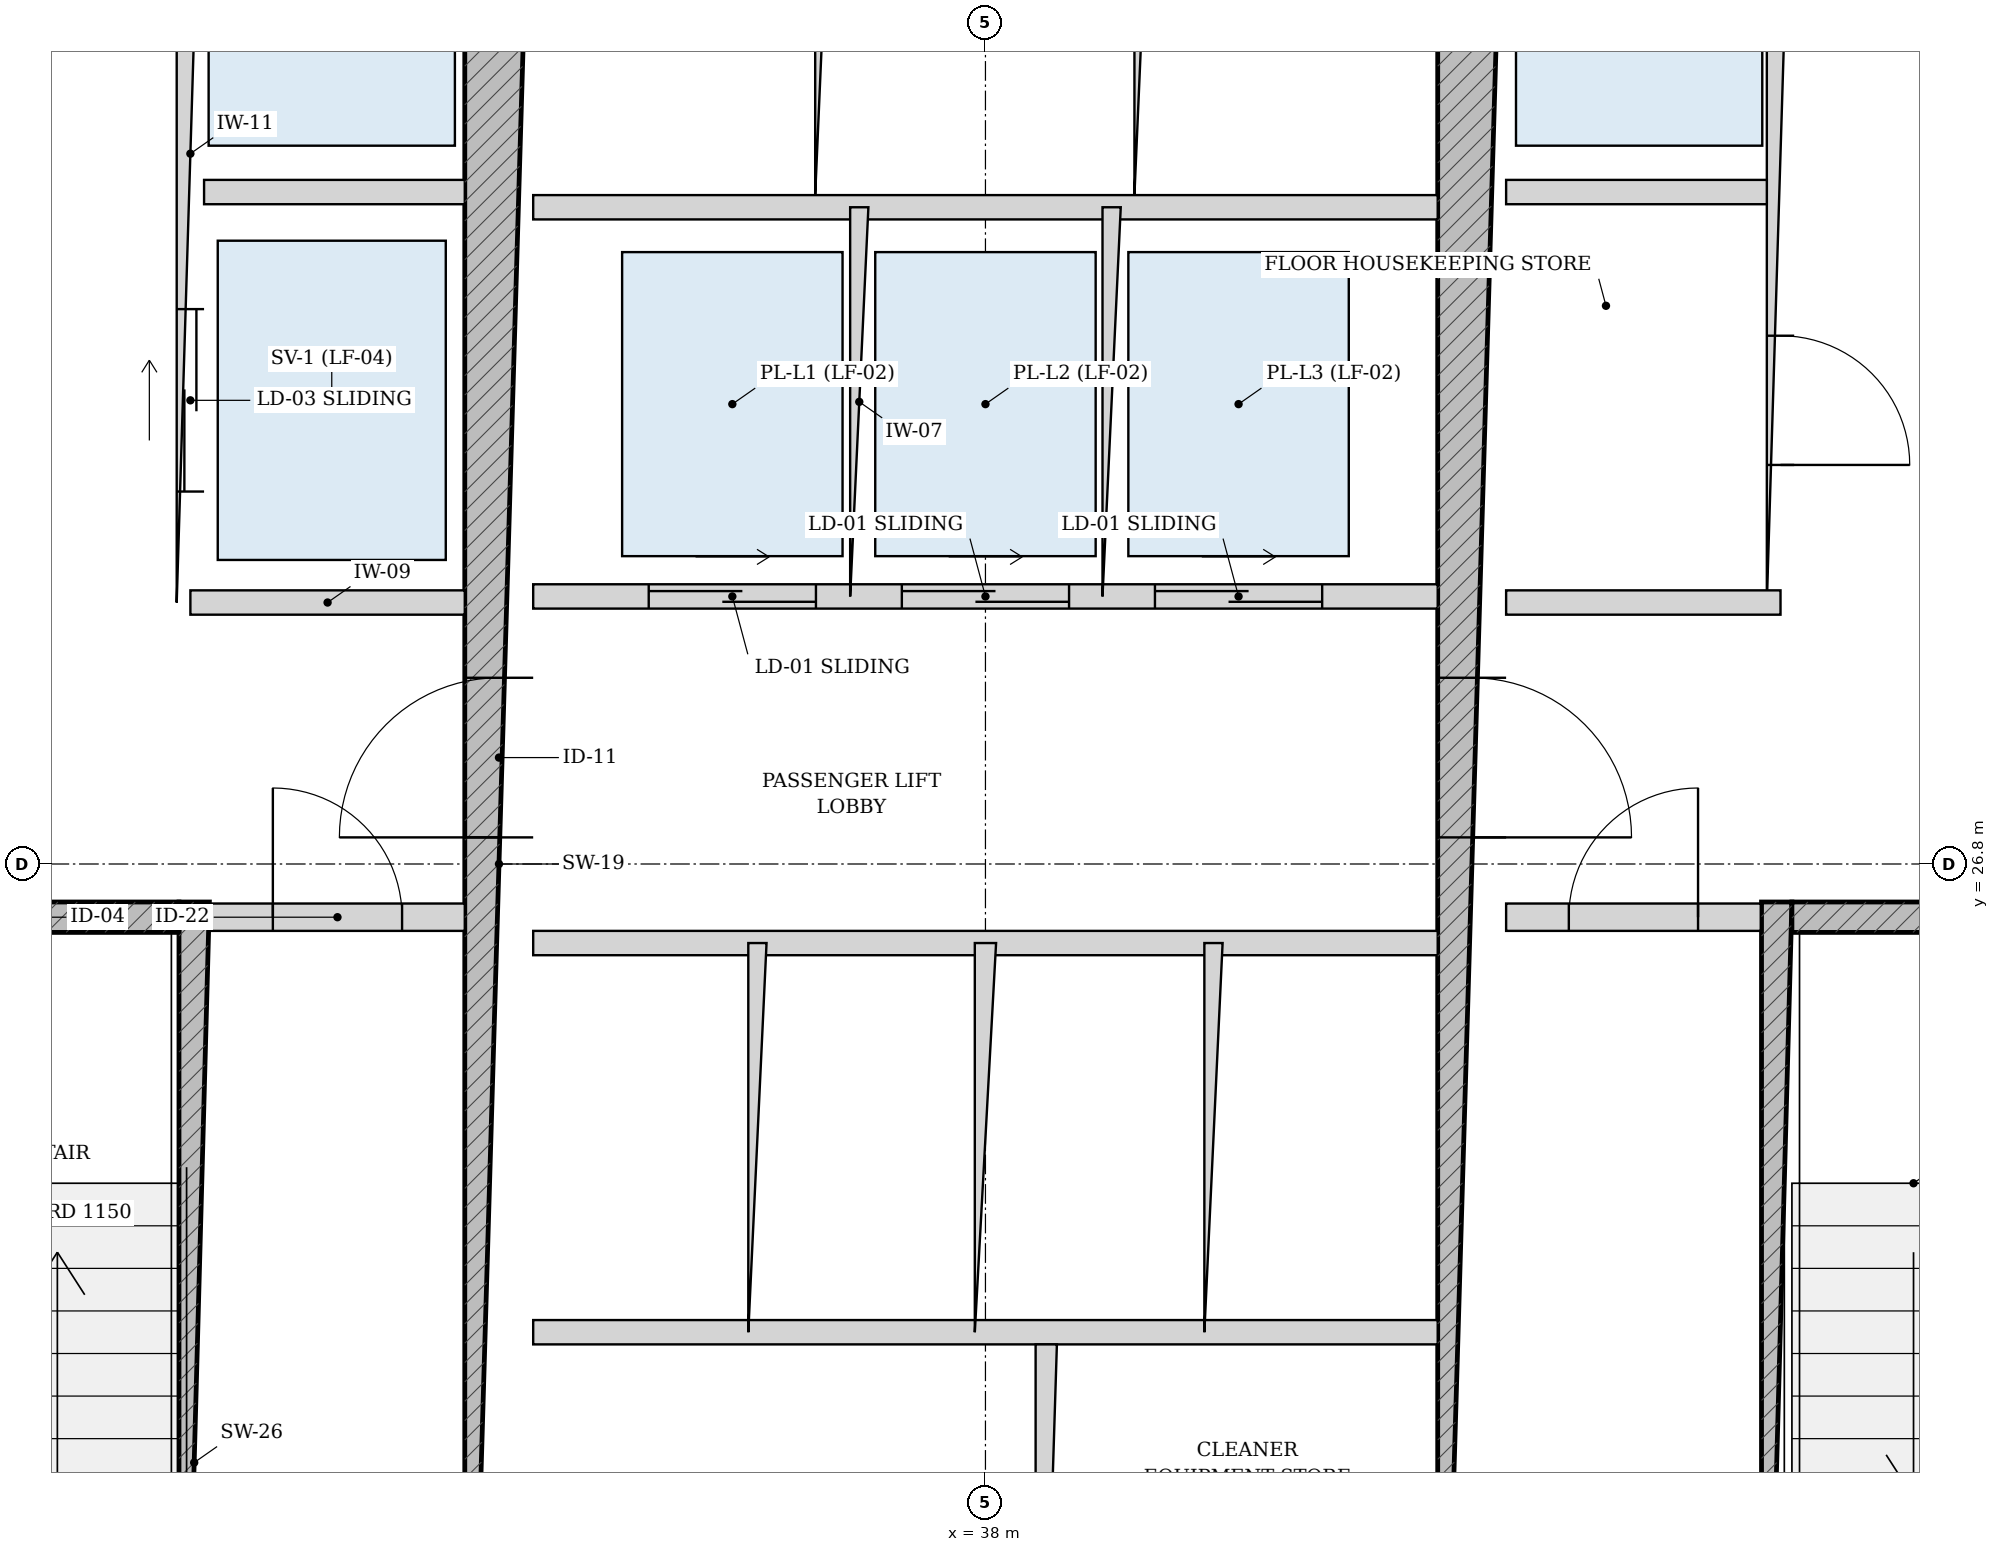
"""IFC4 building model, lengths in metres.
Left out: names, types, materials, properties, quantities, classifications, styles, units other than length and angle.
Written with IfcOpenShell. Run it as: python <this file> out.ifc"""

import sys

from ifc_helpers import new_model, si_unit, direction, frame, frame_2d, origin, place, context, subcontext, project, spatial, rectangle, extrude, source, transform, mapped, element, fill, save


model = new_model("IFC4")
c1 = context("Model", 3, precision=1e-05, world=origin(), true_north=direction((-0.2419218956, 0.970295726276)))
c2 = subcontext(c1, "Body", "Model", "MODEL_VIEW")
j1 = project(units=[si_unit("LENGTHUNIT", "METRE"), si_unit("PLANEANGLEUNIT", "RADIAN")], contexts=[c1])
p1 = place(None, origin())
s1 = spatial("IfcSite", under=j1, at=p1, CompositionType="ELEMENT")
p2 = place(p1, origin())
s2 = spatial("IfcBuilding", under=s1, at=p2, CompositionType="ELEMENT")
p3 = place(p2, frame((0.0, 0.0, 45.6)))
s3 = spatial("IfcBuildingStorey", under=s2, at=p3, CompositionType="ELEMENT", Elevation=45.6)
p4 = place(p3, frame((32.795, 19.175, 0.0), z_axis=(0.0, 0.0, 1.0), x_axis=(0.0, 1.0, 0.0)))
e1 = element("IfcWall", 1, at=p4, inside=s3, PredefinedType="SOLIDWALL", context=c2, shape_type="SweptSolid", body=[
    extrude(rectangle(XDim=7.375, YDim=0.2, at=frame_2d((3.688, 0.0))), origin(), (0.0, 0.0, 1.0), 3.32),
])
p5 = place(p3, frame((29.375, 26.45, 0.0), z_axis=(0.0, 0.0, 1.0), x_axis=(1.0, 0.0, 0.0)))
e2 = element("IfcWall", 2, at=p5, inside=s3, PredefinedType="SOLIDWALL", context=c2, shape_type="SweptSolid", body=[
    extrude(rectangle(XDim=3.32, YDim=0.2, at=frame_2d((1.66, 0.0))), origin(), (0.0, 0.0, 1.0), 3.32),
])
p6 = place(p5, frame((1.185, 0.0, 0.0)))
e3 = element("IfcOpeningElement", 3, at=p6, cuts=e2, PredefinedType="OPENING", context=c2, shape_type="SweptSolid", body=[
    extrude(rectangle(XDim=0.95, YDim=2.15, at=frame_2d((0.475, 1.075))), frame((0.0, 0.11, 0.0), z_axis=(0.0, -1.0, 0.0), x_axis=(1.0, 0.0, 0.0)), (0.0, 0.0, 1.0), 0.22),
])
p7 = place(p3, frame((43.205, 19.175, 0.0), z_axis=(0.0, 0.0, 1.0), x_axis=(0.0, 1.0, 0.0)))
e4 = element("IfcWall", 4, at=p7, inside=s3, PredefinedType="SOLIDWALL", context=c2, shape_type="SweptSolid", body=[
    extrude(rectangle(XDim=7.375, YDim=0.2, at=frame_2d((3.688, 0.0))), origin(), (0.0, 0.0, 1.0), 3.32),
])
p8 = place(p3, frame((43.305, 26.45, 0.0), z_axis=(0.0, 0.0, 1.0), x_axis=(1.0, 0.0, 0.0)))
e5 = element("IfcWall", 5, at=p8, inside=s3, PredefinedType="SOLIDWALL", context=c2, shape_type="SweptSolid", body=[
    extrude(rectangle(XDim=3.32, YDim=0.2, at=frame_2d((1.66, 0.0))), origin(), (0.0, 0.0, 1.0), 3.32),
])
p9 = place(p8, frame((1.185, 0.0, 0.0)))
e6 = element("IfcOpeningElement", 6, at=p9, cuts=e5, PredefinedType="OPENING", context=c2, shape_type="SweptSolid", body=[
    extrude(rectangle(XDim=0.95, YDim=2.15, at=frame_2d((0.475, 1.075))), frame((0.0, 0.11, 0.0), z_axis=(0.0, -1.0, 0.0), x_axis=(1.0, 0.0, 0.0)), (0.0, 0.0, 1.0), 0.22),
])
p10 = place(p3, frame((34.8, 19.175, 0.0), z_axis=(0.0, 0.0, 1.0), x_axis=(0.0, 1.0, 0.0)))
e7 = element("IfcWall", 7, at=p10, inside=s3, PredefinedType="SHEAR", context=c2, shape_type="SweptSolid", body=[
    extrude(rectangle(XDim=15.25, YDim=0.45, at=frame_2d((7.625, 0.0))), origin(), (0.0, 0.0, 1.0), 3.32),
])
p11 = place(p10, frame((7.8, 0.0, 0.0)))
e8 = element("IfcOpeningElement", 8, at=p11, cuts=e7, PredefinedType="OPENING", context=c2, shape_type="SweptSolid", body=[
    extrude(rectangle(XDim=1.05, YDim=2.15, at=frame_2d((0.525, 1.075))), frame((0.0, 0.235, 0.0), z_axis=(0.0, -1.0, 0.0), x_axis=(1.0, 0.0, 0.0)), (0.0, 0.0, 1.0), 0.47),
])
p12 = place(p3, frame((41.2, 19.175, 0.0), z_axis=(0.0, 0.0, 1.0), x_axis=(0.0, 1.0, 0.0)))
e9 = element("IfcWall", 9, at=p12, inside=s3, PredefinedType="SHEAR", context=c2, shape_type="SweptSolid", body=[
    extrude(rectangle(XDim=15.25, YDim=0.45, at=frame_2d((7.625, 0.0))), origin(), (0.0, 0.0, 1.0), 3.32),
])
p13 = place(p12, frame((7.8, 0.0, 0.0)))
e10 = element("IfcOpeningElement", 10, at=p13, cuts=e9, PredefinedType="OPENING", context=c2, shape_type="SweptSolid", body=[
    extrude(rectangle(XDim=1.05, YDim=2.15, at=frame_2d((0.525, 1.075))), frame((0.0, 0.235, 0.0), z_axis=(0.0, -1.0, 0.0), x_axis=(1.0, 0.0, 0.0)), (0.0, 0.0, 1.0), 0.47),
])
p14 = place(p3, frame((32.9, 26.45, 0.0), z_axis=(0.0, 0.0, 1.0), x_axis=(1.0, 0.0, 0.0)))
e11 = element("IfcWall", 11, at=p14, inside=s3, PredefinedType="PARTITIONING", context=c2, shape_type="SweptSolid", body=[
    extrude(rectangle(XDim=1.675, YDim=0.18, at=frame_2d((0.837, 0.0))), origin(), (0.0, 0.0, 1.0), 3.32),
])
p15 = place(p14, frame((0.413, 0.0, 0.0)))
e12 = element("IfcOpeningElement", 12, at=p15, cuts=e11, PredefinedType="OPENING", context=c2, shape_type="SweptSolid", body=[
    extrude(rectangle(XDim=0.85, YDim=2.1, at=frame_2d((0.425, 1.05))), frame((0.0, 0.1, 0.0), z_axis=(0.0, -1.0, 0.0), x_axis=(1.0, 0.0, 0.0)), (0.0, 0.0, 1.0), 0.2),
])
p16 = place(p3, frame((41.425, 26.45, 0.0), z_axis=(0.0, 0.0, 1.0), x_axis=(1.0, 0.0, 0.0)))
e13 = element("IfcWall", 13, at=p16, inside=s3, PredefinedType="PARTITIONING", context=c2, shape_type="SweptSolid", body=[
    extrude(rectangle(XDim=1.675, YDim=0.18, at=frame_2d((0.837, 0.0))), origin(), (0.0, 0.0, 1.0), 3.32),
])
p17 = place(p16, frame((0.413, 0.0, 0.0)))
e14 = element("IfcOpeningElement", 14, at=p17, cuts=e13, PredefinedType="OPENING", context=c2, shape_type="SweptSolid", body=[
    extrude(rectangle(XDim=0.85, YDim=2.1, at=frame_2d((0.425, 1.05))), frame((0.0, 0.1, 0.0), z_axis=(0.0, -1.0, 0.0), x_axis=(1.0, 0.0, 0.0)), (0.0, 0.0, 1.0), 0.2),
])
p18 = place(p3, frame((32.77, 28.52, 0.0), z_axis=(0.0, 0.0, 1.0), x_axis=(0.0, 1.0, 0.0)))
e15 = element("IfcWall", 15, at=p18, inside=s3, PredefinedType="PARTITIONING", context=c2, shape_type="SweptSolid", body=[
    extrude(rectangle(XDim=5.905, YDim=0.18, at=frame_2d((2.953, 0.0))), origin(), (0.0, 0.0, 1.0), 3.32),
])
p19 = place(p18, frame((3.655, 0.0, 0.0)))
e16 = element("IfcOpeningElement", 16, at=p19, cuts=e15, PredefinedType="OPENING", context=c2, shape_type="SweptSolid", body=[
    extrude(rectangle(XDim=1.15, YDim=2.2, at=frame_2d((0.575, 1.1))), frame((0.0, 0.1, 0.0), z_axis=(0.0, -1.0, 0.0), x_axis=(1.0, 0.0, 0.0)), (0.0, 0.0, 1.0), 0.2),
])
p20 = place(p18, frame((0.73, 0.0, 0.0)))
e17 = element("IfcOpeningElement", 17, at=p20, cuts=e15, PredefinedType="OPENING", context=c2, shape_type="SweptSolid", body=[
    extrude(rectangle(XDim=1.2, YDim=2.25, at=frame_2d((0.6, 1.125))), frame((0.0, 0.1, 0.0), z_axis=(0.0, -1.0, 0.0), x_axis=(1.0, 0.0, 0.0)), (0.0, 0.0, 1.0), 0.2),
])
p21 = place(p3, frame((32.86, 31.22, 0.0), z_axis=(0.0, 0.0, 1.0), x_axis=(1.0, 0.0, 0.0)))
e18 = element("IfcWall", 18, at=p21, inside=s3, PredefinedType="PARTITIONING", context=c2, shape_type="SweptSolid", body=[
    extrude(rectangle(XDim=1.715, YDim=0.16, at=frame_2d((0.857, 0.0))), origin(), (0.0, 0.0, 1.0), 3.32),
])
p22 = place(p3, frame((32.77, 28.52, 0.0), z_axis=(0.0, 0.0, 1.0), x_axis=(1.0, 0.0, 0.0)))
e19 = element("IfcWall", 19, at=p22, inside=s3, PredefinedType="PARTITIONING", context=c2, shape_type="SweptSolid", body=[
    extrude(rectangle(XDim=1.805, YDim=0.16, at=frame_2d((0.902, 0.0))), origin(), (0.0, 0.0, 1.0), 3.32),
])
p23 = place(p3, frame((43.23, 28.52, 0.0), z_axis=(0.0, 0.0, 1.0), x_axis=(0.0, 1.0, 0.0)))
e20 = element("IfcWall", 20, at=p23, inside=s3, PredefinedType="PARTITIONING", context=c2, shape_type="SweptSolid", body=[
    extrude(rectangle(XDim=5.905, YDim=0.18, at=frame_2d((2.953, 0.0))), origin(), (0.0, 0.0, 1.0), 3.32),
])
p24 = place(p23, frame((0.905, 0.0, 0.0)))
e21 = element("IfcOpeningElement", 21, at=p24, cuts=e20, PredefinedType="OPENING", context=c2, shape_type="SweptSolid", body=[
    extrude(rectangle(XDim=0.85, YDim=2.1, at=frame_2d((0.425, 1.05))), frame((0.0, 0.1, 0.0), z_axis=(0.0, -1.0, 0.0), x_axis=(1.0, 0.0, 0.0)), (0.0, 0.0, 1.0), 0.2),
])
p25 = place(p23, frame((3.655, 0.0, 0.0)))
e22 = element("IfcOpeningElement", 22, at=p25, cuts=e20, PredefinedType="OPENING", context=c2, shape_type="SweptSolid", body=[
    extrude(rectangle(XDim=1.15, YDim=2.2, at=frame_2d((0.575, 1.1))), frame((0.0, 0.1, 0.0), z_axis=(0.0, -1.0, 0.0), x_axis=(1.0, 0.0, 0.0)), (0.0, 0.0, 1.0), 0.2),
])
p26 = place(p3, frame((41.425, 31.22, 0.0), z_axis=(0.0, 0.0, 1.0), x_axis=(1.0, 0.0, 0.0)))
e23 = element("IfcWall", 23, at=p26, inside=s3, PredefinedType="PARTITIONING", context=c2, shape_type="SweptSolid", body=[
    extrude(rectangle(XDim=1.715, YDim=0.16, at=frame_2d((0.857, 0.0))), origin(), (0.0, 0.0, 1.0), 3.32),
])
p27 = place(p3, frame((41.425, 28.52, 0.0), z_axis=(0.0, 0.0, 1.0), x_axis=(1.0, 0.0, 0.0)))
e24 = element("IfcWall", 24, at=p27, inside=s3, PredefinedType="PARTITIONING", context=c2, shape_type="SweptSolid", body=[
    extrude(rectangle(XDim=1.805, YDim=0.16, at=frame_2d((0.902, 0.0))), origin(), (0.0, 0.0, 1.0), 3.32),
])
p28 = place(p3, frame((35.025, 28.56, 0.0), z_axis=(0.0, 0.0, 1.0), x_axis=(1.0, 0.0, 0.0)))
e25 = element("IfcWall", 25, at=p28, inside=s3, PredefinedType="PARTITIONING", context=c2, shape_type="SweptSolid", body=[
    extrude(rectangle(XDim=5.95, YDim=0.16, at=frame_2d((2.975, 0.0))), origin(), (0.0, 0.0, 1.0), 3.32),
])
p29 = place(p28, frame((0.76, 0.0, 0.0)))
e26 = element("IfcOpeningElement", 26, at=p29, cuts=e25, PredefinedType="OPENING", context=c2, shape_type="SweptSolid", body=[
    extrude(rectangle(XDim=1.1, YDim=2.2, at=frame_2d((0.55, 1.1))), frame((0.0, 0.09, 0.0), z_axis=(0.0, -1.0, 0.0), x_axis=(1.0, 0.0, 0.0)), (0.0, 0.0, 1.0), 0.18),
])
p30 = place(p28, frame((2.425, 0.0, 0.0)))
e27 = element("IfcOpeningElement", 27, at=p30, cuts=e25, PredefinedType="OPENING", context=c2, shape_type="SweptSolid", body=[
    extrude(rectangle(XDim=1.1, YDim=2.2, at=frame_2d((0.55, 1.1))), frame((0.0, 0.09, 0.0), z_axis=(0.0, -1.0, 0.0), x_axis=(1.0, 0.0, 0.0)), (0.0, 0.0, 1.0), 0.18),
])
p31 = place(p28, frame((4.09, 0.0, 0.0)))
e28 = element("IfcOpeningElement", 28, at=p31, cuts=e25, PredefinedType="OPENING", context=c2, shape_type="SweptSolid", body=[
    extrude(rectangle(XDim=1.1, YDim=2.2, at=frame_2d((0.55, 1.1))), frame((0.0, 0.09, 0.0), z_axis=(0.0, -1.0, 0.0), x_axis=(1.0, 0.0, 0.0)), (0.0, 0.0, 1.0), 0.18),
])
p32 = place(p3, frame((35.025, 31.12, 0.0), z_axis=(0.0, 0.0, 1.0), x_axis=(1.0, 0.0, 0.0)))
e29 = element("IfcWall", 29, at=p32, inside=s3, PredefinedType="PARTITIONING", context=c2, shape_type="SweptSolid", body=[
    extrude(rectangle(XDim=5.95, YDim=0.16, at=frame_2d((2.975, 0.0))), origin(), (0.0, 0.0, 1.0), 3.32),
])
for number, where, z_axis, x_axis in (
    (30, (37.17, 28.56, 0.0), (0.0, 0.0, 1.0), (0.0, 1.0, 0.0)),
    (31, (38.83, 28.56, 0.0), (0.0, 0.0, 1.0), (0.0, 1.0, 0.0)),
):
    element("IfcWall", number, at=place(p3, frame(where, z_axis=z_axis, x_axis=x_axis)), inside=s3, PredefinedType="PARTITIONING", context=c2, shape_type="SweptSolid", body=[
        extrude(rectangle(XDim=2.56, YDim=0.12, at=frame_2d((1.28, 0.0))), origin(), (0.0, 0.0, 1.0), 3.32),
    ])
for number, where, z_axis, x_axis in (
    (32, (36.95, 31.2, 0.0), (0.0, 0.0, 1.0), (0.0, 1.0, 0.0)),
    (33, (39.05, 31.2, 0.0), (0.0, 0.0, 1.0), (0.0, 1.0, 0.0)),
):
    element("IfcWall", number, at=place(p3, frame(where, z_axis=z_axis, x_axis=x_axis)), inside=s3, PredefinedType="PARTITIONING", context=c2, shape_type="SweptSolid", body=[
        extrude(rectangle(XDim=3.225, YDim=0.14, at=frame_2d((1.613, 0.0))), origin(), (0.0, 0.0, 1.0), 3.32),
    ])
for number, where, z_axis, x_axis in (
    (34, (35.025, 26.28, 0.0), (0.0, 0.0, 1.0), (1.0, 0.0, 0.0)),
    (35, (35.025, 23.72, 0.0), (0.0, 0.0, 1.0), (1.0, 0.0, 0.0)),
):
    element("IfcWall", number, at=place(p3, frame(where, z_axis=z_axis, x_axis=x_axis)), inside=s3, PredefinedType="PARTITIONING", context=c2, shape_type="SweptSolid", body=[
        extrude(rectangle(XDim=5.95, YDim=0.16, at=frame_2d((2.975, 0.0))), origin(), (0.0, 0.0, 1.0), 3.32),
    ])
p33 = place(p3, frame((36.5, 23.72, 0.0), z_axis=(0.0, 0.0, 1.0), x_axis=(0.0, 1.0, 0.0)))
e36 = element("IfcWall", 36, at=p33, inside=s3, PredefinedType="PARTITIONING", context=c2, shape_type="SweptSolid", body=[
    extrude(rectangle(XDim=2.56, YDim=0.12, at=frame_2d((1.28, 0.0))), origin(), (0.0, 0.0, 1.0), 3.32),
])
p34 = place(p3, frame((38.0, 23.72, 0.0), z_axis=(0.0, 0.0, 1.0), x_axis=(0.0, 1.0, 0.0)))
e37 = element("IfcWall", 37, at=p34, inside=s3, PredefinedType="PARTITIONING", context=c2, shape_type="SweptSolid", body=[
    extrude(rectangle(XDim=2.56, YDim=0.14, at=frame_2d((1.28, 0.0))), origin(), (0.0, 0.0, 1.0), 3.32),
])
p35 = place(p3, frame((39.5, 23.72, 0.0), z_axis=(0.0, 0.0, 1.0), x_axis=(0.0, 1.0, 0.0)))
e38 = element("IfcWall", 38, at=p35, inside=s3, PredefinedType="PARTITIONING", context=c2, shape_type="SweptSolid", body=[
    extrude(rectangle(XDim=2.56, YDim=0.12, at=frame_2d((1.28, 0.0))), origin(), (0.0, 0.0, 1.0), 3.32),
])
p36 = place(p3, frame((38.4, 19.175, 0.0), z_axis=(0.0, 0.0, 1.0), x_axis=(0.0, 1.0, 0.0)))
e39 = element("IfcWall", 39, at=p36, inside=s3, PredefinedType="PARTITIONING", context=c2, shape_type="SweptSolid", body=[
    extrude(rectangle(XDim=4.465, YDim=0.14, at=frame_2d((2.232, 0.0))), origin(), (0.0, 0.0, 1.0), 3.32),
])
m1 = source(origin(), c2, "Body", "SweptSolid", [
    extrude(rectangle(XDim=1.05, YDim=2.15, at=frame_2d((0.525, 1.075))), frame((0.0, 0.025, 0.0), z_axis=(0.0, -1.0, 0.0), x_axis=(1.0, 0.0, 0.0)), (0.0, 0.0, 1.0), 0.05),
])
p37 = place(p11, origin())
e40 = element("IfcDoor", 40, at=p37, inside=s3, OperationType="SINGLE_SWING_LEFT", PredefinedType="DOOR", context=c2, shape_type="MappedRepresentation", body=[
    mapped(m1, transform((0.0, 0.0, 0.0), scale=1.0)),
])
fill(e8, e40)
p38 = place(p13, frame((1.05, 0.0, 0.0), z_axis=(0.0, 0.0, 1.0), x_axis=(-1.0, 0.0, 0.0)))
e41 = element("IfcDoor", 41, at=p38, inside=s3, OperationType="SINGLE_SWING_RIGHT", PredefinedType="DOOR", context=c2, shape_type="MappedRepresentation", body=[
    mapped(m1, transform((0.0, 0.0, 0.0), scale=1.0)),
])
fill(e10, e41)
m2 = source(origin(), c2, "Body", "SweptSolid", [
    extrude(rectangle(XDim=0.85, YDim=2.1, at=frame_2d((0.425, 1.05))), frame((0.0, 0.025, 0.0), z_axis=(0.0, -1.0, 0.0), x_axis=(1.0, 0.0, 0.0)), (0.0, 0.0, 1.0), 0.05),
])
p39 = place(p15, origin())
e42 = element("IfcDoor", 42, at=p39, inside=s3, OperationType="SINGLE_SWING_LEFT", PredefinedType="DOOR", context=c2, shape_type="MappedRepresentation", body=[
    mapped(m2, transform((0.0, 0.0, 0.0), scale=1.0)),
])
fill(e12, e42)
p40 = place(p17, origin())
e43 = element("IfcDoor", 43, at=p40, inside=s3, OperationType="SINGLE_SWING_RIGHT", PredefinedType="DOOR", context=c2, shape_type="MappedRepresentation", body=[
    mapped(m2, transform((0.0, 0.0, 0.0), scale=1.0)),
])
fill(e14, e43)
p41 = place(p24, frame((0.85, 0.0, 0.0), z_axis=(0.0, 0.0, 1.0), x_axis=(-1.0, 0.0, 0.0)))
e44 = element("IfcDoor", 44, at=p41, inside=s3, OperationType="SINGLE_SWING_RIGHT", PredefinedType="DOOR", context=c2, shape_type="MappedRepresentation", body=[
    mapped(m2, transform((0.0, 0.0, 0.0), scale=1.0)),
])
fill(e21, e44)
m3 = source(origin(), c2, "Body", "SweptSolid", [
    extrude(rectangle(XDim=1.2, YDim=2.25, at=frame_2d((0.6, 1.125))), frame((0.0, 0.025, 0.0), z_axis=(0.0, -1.0, 0.0), x_axis=(1.0, 0.0, 0.0)), (0.0, 0.0, 1.0), 0.05),
])
p42 = place(p20, origin())
e45 = element("IfcDoor", 45, at=p42, inside=s3, OperationType="DOUBLE_DOOR_SLIDING", PredefinedType="DOOR", context=c2, shape_type="MappedRepresentation", body=[
    mapped(m3, transform((0.0, 0.0, 0.0), scale=1.0)),
])
fill(e17, e45)
m4 = source(origin(), c2, "Body", "SweptSolid", [
    extrude(rectangle(XDim=1.1, YDim=2.2, at=frame_2d((0.55, 1.1))), frame((0.0, 0.025, 0.0), z_axis=(0.0, -1.0, 0.0), x_axis=(1.0, 0.0, 0.0)), (0.0, 0.0, 1.0), 0.05),
])
p43 = place(p29, origin())
e46 = element("IfcDoor", 46, at=p43, inside=s3, OperationType="DOUBLE_DOOR_SLIDING", PredefinedType="DOOR", context=c2, shape_type="MappedRepresentation", body=[
    mapped(m4, transform((0.0, 0.0, 0.0), scale=1.0)),
])
fill(e26, e46)
p44 = place(p30, origin())
e47 = element("IfcDoor", 47, at=p44, inside=s3, OperationType="DOUBLE_DOOR_SLIDING", PredefinedType="DOOR", context=c2, shape_type="MappedRepresentation", body=[
    mapped(m4, transform((0.0, 0.0, 0.0), scale=1.0)),
])
fill(e27, e47)
p45 = place(p31, origin())
e48 = element("IfcDoor", 48, at=p45, inside=s3, OperationType="DOUBLE_DOOR_SLIDING", PredefinedType="DOOR", context=c2, shape_type="MappedRepresentation", body=[
    mapped(m4, transform((0.0, 0.0, 0.0), scale=1.0)),
])
fill(e28, e48)
save(model, sys.argv[1])
